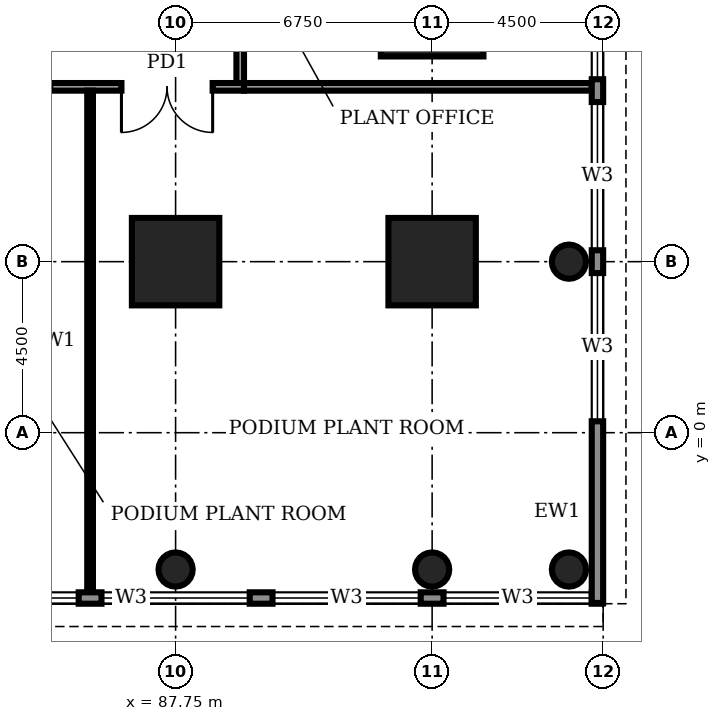
"""IFC4 building model, lengths in metres.
Left out: names, types, materials, properties, quantities, classifications, styles, units other than length and angle.
Written with IfcOpenShell. Run it as: python <this file> out.ifc"""

import sys

from ifc_helpers import new_model, si_unit, direction, frame, frame_2d, origin, origin_2d, place, context, subcontext, project, spatial, rectangle, circle, extrude, element, fill, save


model = new_model("IFC4")
c1 = context("Model", 3, precision=1e-05, world=origin(), true_north=direction((0.0, 1.0)))
c2 = subcontext(c1, "Body", "Model", "MODEL_VIEW")
j1 = project(units=[si_unit("LENGTHUNIT", "METRE"), si_unit("PLANEANGLEUNIT", "RADIAN")], contexts=[c1])
p1 = place(None, origin())
s1 = spatial("IfcSite", under=j1, at=p1, CompositionType="ELEMENT")
p2 = place(p1, origin())
s2 = spatial("IfcBuilding", under=s1, at=p2, CompositionType="ELEMENT")
p3 = place(p2, frame((0.0, 0.0, 16.0)))
s3 = spatial("IfcBuildingStorey", under=s2, at=p3, CompositionType="ELEMENT", Elevation=16.0)
for number, where, z_axis, x_axis in (
    (1, (87.75, 4.5, 0.0), (0.0, 0.0, 1.0), (1.0, 0.0, 0.0)),
    (2, (94.5, 4.5, 0.0), (0.0, 0.0, 1.0), (1.0, 0.0, 0.0)),
):
    element("IfcColumn", number, at=place(p3, frame(where, z_axis=z_axis, x_axis=x_axis)), inside=s3, PredefinedType="COLUMN", context=c2, shape_type="SweptSolid", body=[
        extrude(rectangle(XDim=2.3, YDim=2.3, at=origin_2d()), origin(), (0.0, 0.0, 1.0), 5.0),
    ])
p4 = place(p3, frame((94.5, 11.25, 0.0), z_axis=(0.0, 0.0, 1.0), x_axis=(1.0, 0.0, 0.0)))
e3 = element("IfcColumn", 3, at=p4, inside=s3, PredefinedType="COLUMN", context=c2, shape_type="SweptSolid", body=[
    extrude(rectangle(XDim=2.7, YDim=2.7, at=origin_2d()), origin(), (0.0, 0.0, 1.0), 5.0),
])
for number, where, z_axis, x_axis in (
    (4, (87.75, -3.6, 0.0), (0.0, 0.0, 1.0), (1.0, 0.0, 0.0)),
    (5, (94.5, -3.6, 0.0), (0.0, 0.0, 1.0), (1.0, 0.0, 0.0)),
    (6, (98.1, -3.6, 0.0), (0.0, 0.0, 1.0), (1.0, 0.0, 0.0)),
    (7, (98.1, 4.5, 0.0), (0.0, 0.0, 1.0), (1.0, 0.0, 0.0)),
):
    element("IfcColumn", number, at=place(p3, frame(where, z_axis=z_axis, x_axis=x_axis)), inside=s3, PredefinedType="COLUMN", context=c2, shape_type="SweptSolid", body=[
        extrude(circle(Radius=0.45, at=origin_2d()), origin(), (0.0, 0.0, 1.0), 5.0),
    ])
p5 = place(p3, frame((0.02, -4.35, 0.0), z_axis=(0.0, 0.0, 1.0), x_axis=(1.0, 0.0, 0.0)))
e8 = element("IfcWall", 8, at=p5, inside=s3, PredefinedType="STANDARD", context=c2, shape_type="SweptSolid", body=[
    extrude(rectangle(XDim=98.96, YDim=0.3, at=frame_2d((49.48, 0.0))), origin(), (0.0, 0.0, 1.0), 4.7),
])
p6 = place(p5, frame((4.78, 0.0, 0.95)))
e9 = element("IfcOpeningElement", 9, at=p6, cuts=e8, PredefinedType="OPENING", context=c2, shape_type="SweptSolid", body=[
    extrude(rectangle(XDim=3.9, YDim=1.8, at=frame_2d((1.95, 0.9))), frame((0.0, 0.16, 0.0), z_axis=(0.0, -1.0, 0.0), x_axis=(1.0, 0.0, 0.0)), (0.0, 0.0, 1.0), 0.32),
])
p7 = place(p5, frame((9.28, 0.0, 0.95)))
e10 = element("IfcOpeningElement", 10, at=p7, cuts=e8, PredefinedType="OPENING", context=c2, shape_type="SweptSolid", body=[
    extrude(rectangle(XDim=3.9, YDim=1.8, at=frame_2d((1.95, 0.9))), frame((0.0, 0.16, 0.0), z_axis=(0.0, -1.0, 0.0), x_axis=(1.0, 0.0, 0.0)), (0.0, 0.0, 1.0), 0.32),
])
p8 = place(p5, frame((13.78, 0.0, 0.95)))
e11 = element("IfcOpeningElement", 11, at=p8, cuts=e8, PredefinedType="OPENING", context=c2, shape_type="SweptSolid", body=[
    extrude(rectangle(XDim=3.9, YDim=1.8, at=frame_2d((1.95, 0.9))), frame((0.0, 0.16, 0.0), z_axis=(0.0, -1.0, 0.0), x_axis=(1.0, 0.0, 0.0)), (0.0, 0.0, 1.0), 0.32),
])
p9 = place(p5, frame((18.28, 0.0, 0.95)))
e12 = element("IfcOpeningElement", 12, at=p9, cuts=e8, PredefinedType="OPENING", context=c2, shape_type="SweptSolid", body=[
    extrude(rectangle(XDim=3.9, YDim=1.8, at=frame_2d((1.95, 0.9))), frame((0.0, 0.16, 0.0), z_axis=(0.0, -1.0, 0.0), x_axis=(1.0, 0.0, 0.0)), (0.0, 0.0, 1.0), 0.32),
])
p10 = place(p5, frame((22.78, 0.0, 0.95)))
e13 = element("IfcOpeningElement", 13, at=p10, cuts=e8, PredefinedType="OPENING", context=c2, shape_type="SweptSolid", body=[
    extrude(rectangle(XDim=3.9, YDim=1.8, at=frame_2d((1.95, 0.9))), frame((0.0, 0.16, 0.0), z_axis=(0.0, -1.0, 0.0), x_axis=(1.0, 0.0, 0.0)), (0.0, 0.0, 1.0), 0.32),
])
p11 = place(p5, frame((27.28, 0.0, 0.95)))
e14 = element("IfcOpeningElement", 14, at=p11, cuts=e8, PredefinedType="OPENING", context=c2, shape_type="SweptSolid", body=[
    extrude(rectangle(XDim=3.9, YDim=1.8, at=frame_2d((1.95, 0.9))), frame((0.0, 0.16, 0.0), z_axis=(0.0, -1.0, 0.0), x_axis=(1.0, 0.0, 0.0)), (0.0, 0.0, 1.0), 0.32),
])
p12 = place(p5, frame((31.78, 0.0, 0.95)))
e15 = element("IfcOpeningElement", 15, at=p12, cuts=e8, PredefinedType="OPENING", context=c2, shape_type="SweptSolid", body=[
    extrude(rectangle(XDim=3.9, YDim=1.8, at=frame_2d((1.95, 0.9))), frame((0.0, 0.16, 0.0), z_axis=(0.0, -1.0, 0.0), x_axis=(1.0, 0.0, 0.0)), (0.0, 0.0, 1.0), 0.32),
])
p13 = place(p5, frame((36.28, 0.0, 0.95)))
e16 = element("IfcOpeningElement", 16, at=p13, cuts=e8, PredefinedType="OPENING", context=c2, shape_type="SweptSolid", body=[
    extrude(rectangle(XDim=3.9, YDim=1.8, at=frame_2d((1.95, 0.9))), frame((0.0, 0.16, 0.0), z_axis=(0.0, -1.0, 0.0), x_axis=(1.0, 0.0, 0.0)), (0.0, 0.0, 1.0), 0.32),
])
p14 = place(p5, frame((40.78, 0.0, 0.95)))
e17 = element("IfcOpeningElement", 17, at=p14, cuts=e8, PredefinedType="OPENING", context=c2, shape_type="SweptSolid", body=[
    extrude(rectangle(XDim=3.9, YDim=1.8, at=frame_2d((1.95, 0.9))), frame((0.0, 0.16, 0.0), z_axis=(0.0, -1.0, 0.0), x_axis=(1.0, 0.0, 0.0)), (0.0, 0.0, 1.0), 0.32),
])
p15 = place(p5, frame((45.28, 0.0, 0.95)))
e18 = element("IfcOpeningElement", 18, at=p15, cuts=e8, PredefinedType="OPENING", context=c2, shape_type="SweptSolid", body=[
    extrude(rectangle(XDim=3.9, YDim=1.8, at=frame_2d((1.95, 0.9))), frame((0.0, 0.16, 0.0), z_axis=(0.0, -1.0, 0.0), x_axis=(1.0, 0.0, 0.0)), (0.0, 0.0, 1.0), 0.32),
])
p16 = place(p5, frame((49.78, 0.0, 0.95)))
e19 = element("IfcOpeningElement", 19, at=p16, cuts=e8, PredefinedType="OPENING", context=c2, shape_type="SweptSolid", body=[
    extrude(rectangle(XDim=3.9, YDim=1.8, at=frame_2d((1.95, 0.9))), frame((0.0, 0.16, 0.0), z_axis=(0.0, -1.0, 0.0), x_axis=(1.0, 0.0, 0.0)), (0.0, 0.0, 1.0), 0.32),
])
p17 = place(p5, frame((54.28, 0.0, 0.95)))
e20 = element("IfcOpeningElement", 20, at=p17, cuts=e8, PredefinedType="OPENING", context=c2, shape_type="SweptSolid", body=[
    extrude(rectangle(XDim=3.9, YDim=1.8, at=frame_2d((1.95, 0.9))), frame((0.0, 0.16, 0.0), z_axis=(0.0, -1.0, 0.0), x_axis=(1.0, 0.0, 0.0)), (0.0, 0.0, 1.0), 0.32),
])
p18 = place(p5, frame((58.78, 0.0, 0.95)))
e21 = element("IfcOpeningElement", 21, at=p18, cuts=e8, PredefinedType="OPENING", context=c2, shape_type="SweptSolid", body=[
    extrude(rectangle(XDim=3.9, YDim=1.8, at=frame_2d((1.95, 0.9))), frame((0.0, 0.16, 0.0), z_axis=(0.0, -1.0, 0.0), x_axis=(1.0, 0.0, 0.0)), (0.0, 0.0, 1.0), 0.32),
])
p19 = place(p5, frame((63.28, 0.0, 0.95)))
e22 = element("IfcOpeningElement", 22, at=p19, cuts=e8, PredefinedType="OPENING", context=c2, shape_type="SweptSolid", body=[
    extrude(rectangle(XDim=3.9, YDim=1.8, at=frame_2d((1.95, 0.9))), frame((0.0, 0.16, 0.0), z_axis=(0.0, -1.0, 0.0), x_axis=(1.0, 0.0, 0.0)), (0.0, 0.0, 1.0), 0.32),
])
p20 = place(p5, frame((67.78, 0.0, 0.95)))
e23 = element("IfcOpeningElement", 23, at=p20, cuts=e8, PredefinedType="OPENING", context=c2, shape_type="SweptSolid", body=[
    extrude(rectangle(XDim=3.9, YDim=1.8, at=frame_2d((1.95, 0.9))), frame((0.0, 0.16, 0.0), z_axis=(0.0, -1.0, 0.0), x_axis=(1.0, 0.0, 0.0)), (0.0, 0.0, 1.0), 0.32),
])
p21 = place(p5, frame((72.28, 0.0, 0.95)))
e24 = element("IfcOpeningElement", 24, at=p21, cuts=e8, PredefinedType="OPENING", context=c2, shape_type="SweptSolid", body=[
    extrude(rectangle(XDim=3.9, YDim=1.8, at=frame_2d((1.95, 0.9))), frame((0.0, 0.16, 0.0), z_axis=(0.0, -1.0, 0.0), x_axis=(1.0, 0.0, 0.0)), (0.0, 0.0, 1.0), 0.32),
])
p22 = place(p5, frame((76.78, 0.0, 0.95)))
e25 = element("IfcOpeningElement", 25, at=p22, cuts=e8, PredefinedType="OPENING", context=c2, shape_type="SweptSolid", body=[
    extrude(rectangle(XDim=3.9, YDim=1.8, at=frame_2d((1.95, 0.9))), frame((0.0, 0.16, 0.0), z_axis=(0.0, -1.0, 0.0), x_axis=(1.0, 0.0, 0.0)), (0.0, 0.0, 1.0), 0.32),
])
p23 = place(p5, frame((81.28, 0.0, 0.95)))
e26 = element("IfcOpeningElement", 26, at=p23, cuts=e8, PredefinedType="OPENING", context=c2, shape_type="SweptSolid", body=[
    extrude(rectangle(XDim=3.9, YDim=1.8, at=frame_2d((1.95, 0.9))), frame((0.0, 0.16, 0.0), z_axis=(0.0, -1.0, 0.0), x_axis=(1.0, 0.0, 0.0)), (0.0, 0.0, 1.0), 0.32),
])
p24 = place(p5, frame((85.78, 0.0, 0.95)))
e27 = element("IfcOpeningElement", 27, at=p24, cuts=e8, PredefinedType="OPENING", context=c2, shape_type="SweptSolid", body=[
    extrude(rectangle(XDim=3.9, YDim=1.8, at=frame_2d((1.95, 0.9))), frame((0.0, 0.16, 0.0), z_axis=(0.0, -1.0, 0.0), x_axis=(1.0, 0.0, 0.0)), (0.0, 0.0, 1.0), 0.32),
])
p25 = place(p5, frame((90.28, 0.0, 0.95)))
e28 = element("IfcOpeningElement", 28, at=p25, cuts=e8, PredefinedType="OPENING", context=c2, shape_type="SweptSolid", body=[
    extrude(rectangle(XDim=3.9, YDim=1.8, at=frame_2d((1.95, 0.9))), frame((0.0, 0.16, 0.0), z_axis=(0.0, -1.0, 0.0), x_axis=(1.0, 0.0, 0.0)), (0.0, 0.0, 1.0), 0.32),
])
p26 = place(p5, frame((94.78, 0.0, 0.95)))
e29 = element("IfcOpeningElement", 29, at=p26, cuts=e8, PredefinedType="OPENING", context=c2, shape_type="SweptSolid", body=[
    extrude(rectangle(XDim=3.9, YDim=1.8, at=frame_2d((1.95, 0.9))), frame((0.0, 0.16, 0.0), z_axis=(0.0, -1.0, 0.0), x_axis=(1.0, 0.0, 0.0)), (0.0, 0.0, 1.0), 0.32),
])
p27 = place(p3, frame((98.85, -4.48, 0.0), z_axis=(0.0, 0.0, 1.0), x_axis=(0.0, 1.0, 0.0)))
e30 = element("IfcWall", 30, at=p27, inside=s3, PredefinedType="STANDARD", context=c2, shape_type="SweptSolid", body=[
    extrude(rectangle(XDim=53.96, YDim=0.3, at=frame_2d((26.98, 0.0))), origin(), (0.0, 0.0, 1.0), 4.7),
])
p28 = place(p27, frame((4.78, 0.0, 0.95)))
e31 = element("IfcOpeningElement", 31, at=p28, cuts=e30, PredefinedType="OPENING", context=c2, shape_type="SweptSolid", body=[
    extrude(rectangle(XDim=3.9, YDim=1.8, at=frame_2d((1.95, 0.9))), frame((0.0, 0.16, 0.0), z_axis=(0.0, -1.0, 0.0), x_axis=(1.0, 0.0, 0.0)), (0.0, 0.0, 1.0), 0.32),
])
p29 = place(p27, frame((9.28, 0.0, 0.95)))
e32 = element("IfcOpeningElement", 32, at=p29, cuts=e30, PredefinedType="OPENING", context=c2, shape_type="SweptSolid", body=[
    extrude(rectangle(XDim=3.9, YDim=1.8, at=frame_2d((1.95, 0.9))), frame((0.0, 0.16, 0.0), z_axis=(0.0, -1.0, 0.0), x_axis=(1.0, 0.0, 0.0)), (0.0, 0.0, 1.0), 0.32),
])
p30 = place(p27, frame((13.78, 0.0, 0.95)))
e33 = element("IfcOpeningElement", 33, at=p30, cuts=e30, PredefinedType="OPENING", context=c2, shape_type="SweptSolid", body=[
    extrude(rectangle(XDim=3.9, YDim=1.8, at=frame_2d((1.95, 0.9))), frame((0.0, 0.16, 0.0), z_axis=(0.0, -1.0, 0.0), x_axis=(1.0, 0.0, 0.0)), (0.0, 0.0, 1.0), 0.32),
])
p31 = place(p27, frame((18.28, 0.0, 0.95)))
e34 = element("IfcOpeningElement", 34, at=p31, cuts=e30, PredefinedType="OPENING", context=c2, shape_type="SweptSolid", body=[
    extrude(rectangle(XDim=3.9, YDim=1.8, at=frame_2d((1.95, 0.9))), frame((0.0, 0.16, 0.0), z_axis=(0.0, -1.0, 0.0), x_axis=(1.0, 0.0, 0.0)), (0.0, 0.0, 1.0), 0.32),
])
p32 = place(p27, frame((22.78, 0.0, 0.95)))
e35 = element("IfcOpeningElement", 35, at=p32, cuts=e30, PredefinedType="OPENING", context=c2, shape_type="SweptSolid", body=[
    extrude(rectangle(XDim=3.9, YDim=1.8, at=frame_2d((1.95, 0.9))), frame((0.0, 0.16, 0.0), z_axis=(0.0, -1.0, 0.0), x_axis=(1.0, 0.0, 0.0)), (0.0, 0.0, 1.0), 0.32),
])
p33 = place(p27, frame((27.28, 0.0, 0.95)))
e36 = element("IfcOpeningElement", 36, at=p33, cuts=e30, PredefinedType="OPENING", context=c2, shape_type="SweptSolid", body=[
    extrude(rectangle(XDim=3.9, YDim=1.8, at=frame_2d((1.95, 0.9))), frame((0.0, 0.16, 0.0), z_axis=(0.0, -1.0, 0.0), x_axis=(1.0, 0.0, 0.0)), (0.0, 0.0, 1.0), 0.32),
])
p34 = place(p27, frame((31.78, 0.0, 0.95)))
e37 = element("IfcOpeningElement", 37, at=p34, cuts=e30, PredefinedType="OPENING", context=c2, shape_type="SweptSolid", body=[
    extrude(rectangle(XDim=3.9, YDim=1.8, at=frame_2d((1.95, 0.9))), frame((0.0, 0.16, 0.0), z_axis=(0.0, -1.0, 0.0), x_axis=(1.0, 0.0, 0.0)), (0.0, 0.0, 1.0), 0.32),
])
p35 = place(p27, frame((36.28, 0.0, 0.95)))
e38 = element("IfcOpeningElement", 38, at=p35, cuts=e30, PredefinedType="OPENING", context=c2, shape_type="SweptSolid", body=[
    extrude(rectangle(XDim=3.9, YDim=1.8, at=frame_2d((1.95, 0.9))), frame((0.0, 0.16, 0.0), z_axis=(0.0, -1.0, 0.0), x_axis=(1.0, 0.0, 0.0)), (0.0, 0.0, 1.0), 0.32),
])
p36 = place(p27, frame((40.78, 0.0, 0.95)))
e39 = element("IfcOpeningElement", 39, at=p36, cuts=e30, PredefinedType="OPENING", context=c2, shape_type="SweptSolid", body=[
    extrude(rectangle(XDim=3.9, YDim=1.8, at=frame_2d((1.95, 0.9))), frame((0.0, 0.16, 0.0), z_axis=(0.0, -1.0, 0.0), x_axis=(1.0, 0.0, 0.0)), (0.0, 0.0, 1.0), 0.32),
])
p37 = place(p27, frame((45.28, 0.0, 0.95)))
e40 = element("IfcOpeningElement", 40, at=p37, cuts=e30, PredefinedType="OPENING", context=c2, shape_type="SweptSolid", body=[
    extrude(rectangle(XDim=3.9, YDim=1.8, at=frame_2d((1.95, 0.9))), frame((0.0, 0.16, 0.0), z_axis=(0.0, -1.0, 0.0), x_axis=(1.0, 0.0, 0.0)), (0.0, 0.0, 1.0), 0.32),
])
p38 = place(p27, frame((49.78, 0.0, 0.95)))
e41 = element("IfcOpeningElement", 41, at=p38, cuts=e30, PredefinedType="OPENING", context=c2, shape_type="SweptSolid", body=[
    extrude(rectangle(XDim=3.9, YDim=1.8, at=frame_2d((1.95, 0.9))), frame((0.0, 0.16, 0.0), z_axis=(0.0, -1.0, 0.0), x_axis=(1.0, 0.0, 0.0)), (0.0, 0.0, 1.0), 0.32),
])
p39 = place(p3, frame((72.65, 9.1, 0.0), z_axis=(0.0, 0.0, 1.0), x_axis=(1.0, 0.0, 0.0)))
e42 = element("IfcWall", 42, at=p39, inside=s3, PredefinedType="SOLIDWALL", context=c2, shape_type="SweptSolid", body=[
    extrude(rectangle(XDim=16.9, YDim=0.2, at=frame_2d((8.45, 0.0))), origin(), (0.0, 0.0, 1.0), 4.7),
])
p40 = place(p39, frame((0.925, 0.0, 0.0)))
e43 = element("IfcOpeningElement", 43, at=p40, cuts=e42, PredefinedType="OPENING", context=c2, shape_type="SweptSolid", body=[
    extrude(rectangle(XDim=1.8, YDim=2.1, at=frame_2d((0.9, 1.05))), frame((0.0, 0.11, 0.0), z_axis=(0.0, -1.0, 0.0), x_axis=(1.0, 0.0, 0.0)), (0.0, 0.0, 1.0), 0.22),
])
p41 = place(p39, frame((4.9, 0.0, 0.0)))
e44 = element("IfcOpeningElement", 44, at=p41, cuts=e42, PredefinedType="OPENING", context=c2, shape_type="SweptSolid", body=[
    extrude(rectangle(XDim=2.4, YDim=2.7, at=frame_2d((1.2, 1.35))), frame((0.0, 0.11, 0.0), z_axis=(0.0, -1.0, 0.0), x_axis=(1.0, 0.0, 0.0)), (0.0, 0.0, 1.0), 0.22),
])
p42 = place(p39, frame((9.4, 0.0, 0.0)))
e45 = element("IfcOpeningElement", 45, at=p42, cuts=e42, PredefinedType="OPENING", context=c2, shape_type="SweptSolid", body=[
    extrude(rectangle(XDim=2.4, YDim=2.7, at=frame_2d((1.2, 1.35))), frame((0.0, 0.11, 0.0), z_axis=(0.0, -1.0, 0.0), x_axis=(1.0, 0.0, 0.0)), (0.0, 0.0, 1.0), 0.22),
])
p43 = place(p39, frame((13.675, 0.0, 0.0)))
e46 = element("IfcOpeningElement", 46, at=p43, cuts=e42, PredefinedType="OPENING", context=c2, shape_type="SweptSolid", body=[
    extrude(rectangle(XDim=2.4, YDim=2.7, at=frame_2d((1.2, 1.35))), frame((0.0, 0.11, 0.0), z_axis=(0.0, -1.0, 0.0), x_axis=(1.0, 0.0, 0.0)), (0.0, 0.0, 1.0), 0.22),
])
p44 = place(p3, frame((89.45, 9.2, 0.0), z_axis=(0.0, 0.0, 1.0), x_axis=(0.0, 1.0, 0.0)))
e47 = element("IfcWall", 47, at=p44, inside=s3, PredefinedType="SOLIDWALL", context=c2, shape_type="SweptSolid", body=[
    extrude(rectangle(XDim=22.3, YDim=0.2, at=frame_2d((11.15, 0.0))), origin(), (0.0, 0.0, 1.0), 4.7),
])
p45 = place(p44, frame((1.55, 0.0, 0.0)))
e48 = element("IfcOpeningElement", 48, at=p45, cuts=e47, PredefinedType="OPENING", context=c2, shape_type="SweptSolid", body=[
    extrude(rectangle(XDim=1.0, YDim=2.1, at=frame_2d((0.5, 1.05))), frame((0.0, 0.11, 0.0), z_axis=(0.0, -1.0, 0.0), x_axis=(1.0, 0.0, 0.0)), (0.0, 0.0, 1.0), 0.22),
])
p46 = place(p44, frame((5.75, 0.0, 0.0)))
e49 = element("IfcOpeningElement", 49, at=p46, cuts=e47, PredefinedType="OPENING", context=c2, shape_type="SweptSolid", body=[
    extrude(rectangle(XDim=0.9, YDim=2.1, at=frame_2d((0.45, 1.05))), frame((0.0, 0.11, 0.0), z_axis=(0.0, -1.0, 0.0), x_axis=(1.0, 0.0, 0.0)), (0.0, 0.0, 1.0), 0.22),
])
p47 = place(p44, frame((8.75, 0.0, 0.0)))
e50 = element("IfcOpeningElement", 50, at=p47, cuts=e47, PredefinedType="OPENING", context=c2, shape_type="SweptSolid", body=[
    extrude(rectangle(XDim=0.9, YDim=2.1, at=frame_2d((0.45, 1.05))), frame((0.0, 0.11, 0.0), z_axis=(0.0, -1.0, 0.0), x_axis=(1.0, 0.0, 0.0)), (0.0, 0.0, 1.0), 0.22),
])
p48 = place(p44, frame((13.6, 0.0, 0.0)))
e51 = element("IfcOpeningElement", 51, at=p48, cuts=e47, PredefinedType="OPENING", context=c2, shape_type="SweptSolid", body=[
    extrude(rectangle(XDim=0.9, YDim=2.1, at=frame_2d((0.45, 1.05))), frame((0.0, 0.11, 0.0), z_axis=(0.0, -1.0, 0.0), x_axis=(1.0, 0.0, 0.0)), (0.0, 0.0, 1.0), 0.22),
])
p49 = place(p44, frame((16.3, 0.0, 0.0)))
e52 = element("IfcOpeningElement", 52, at=p49, cuts=e47, PredefinedType="OPENING", context=c2, shape_type="SweptSolid", body=[
    extrude(rectangle(XDim=1.0, YDim=2.1, at=frame_2d((0.5, 1.05))), frame((0.0, 0.11, 0.0), z_axis=(0.0, -1.0, 0.0), x_axis=(1.0, 0.0, 0.0)), (0.0, 0.0, 1.0), 0.22),
])
p50 = place(p44, frame((10.8, 0.0, 0.0)))
e53 = element("IfcOpeningElement", 53, at=p50, cuts=e47, PredefinedType="OPENING", context=c2, shape_type="SweptSolid", body=[
    extrude(rectangle(XDim=1.0, YDim=2.1, at=frame_2d((0.5, 1.05))), frame((0.0, 0.11, 0.0), z_axis=(0.0, -1.0, 0.0), x_axis=(1.0, 0.0, 0.0)), (0.0, 0.0, 1.0), 0.22),
])
p51 = place(p44, frame((19.55, 0.0, 0.0)))
e54 = element("IfcOpeningElement", 54, at=p51, cuts=e47, PredefinedType="OPENING", context=c2, shape_type="SweptSolid", body=[
    extrude(rectangle(XDim=1.0, YDim=2.1, at=frame_2d((0.5, 1.05))), frame((0.0, 0.11, 0.0), z_axis=(0.0, -1.0, 0.0), x_axis=(1.0, 0.0, 0.0)), (0.0, 0.0, 1.0), 0.22),
])
p52 = place(p3, frame((89.55, 9.1, 0.0), z_axis=(0.0, 0.0, 1.0), x_axis=(1.0, 0.0, 0.0)))
e55 = element("IfcWall", 55, at=p52, inside=s3, PredefinedType="SOLIDWALL", context=c2, shape_type="SweptSolid", body=[
    extrude(rectangle(XDim=9.15, YDim=0.2, at=frame_2d((4.575, 0.0))), origin(), (0.0, 0.0, 1.0), 4.7),
])
p53 = place(p3, frame((85.5, -4.2, 0.0), z_axis=(0.0, 0.0, 1.0), x_axis=(0.0, 1.0, 0.0)))
e56 = element("IfcWall", 56, at=p53, inside=s3, PredefinedType="PARTITIONING", context=c2, shape_type="SweptSolid", body=[
    extrude(rectangle(XDim=13.2, YDim=0.15, at=frame_2d((6.6, 0.0))), origin(), (0.0, 0.0, 1.0), 4.7),
])
p54 = place(p23, origin())
e57 = element("IfcWindow", 57, at=p54, inside=s3, PartitioningType="SINGLE_PANEL", PredefinedType="WINDOW", context=c2, shape_type="SweptSolid", body=[
    extrude(rectangle(XDim=3.9, YDim=1.8, at=frame_2d((1.95, 0.9))), frame((0.0, 0.03, 0.0), z_axis=(0.0, -1.0, 0.0), x_axis=(1.0, 0.0, 0.0)), (0.0, 0.0, 1.0), 0.06),
])
fill(e26, e57)
p55 = place(p24, origin())
e58 = element("IfcWindow", 58, at=p55, inside=s3, PartitioningType="SINGLE_PANEL", PredefinedType="WINDOW", context=c2, shape_type="SweptSolid", body=[
    extrude(rectangle(XDim=3.9, YDim=1.8, at=frame_2d((1.95, 0.9))), frame((0.0, 0.03, 0.0), z_axis=(0.0, -1.0, 0.0), x_axis=(1.0, 0.0, 0.0)), (0.0, 0.0, 1.0), 0.06),
])
fill(e27, e58)
p56 = place(p25, origin())
e59 = element("IfcWindow", 59, at=p56, inside=s3, PartitioningType="SINGLE_PANEL", PredefinedType="WINDOW", context=c2, shape_type="SweptSolid", body=[
    extrude(rectangle(XDim=3.9, YDim=1.8, at=frame_2d((1.95, 0.9))), frame((0.0, 0.03, 0.0), z_axis=(0.0, -1.0, 0.0), x_axis=(1.0, 0.0, 0.0)), (0.0, 0.0, 1.0), 0.06),
])
fill(e28, e59)
p57 = place(p26, origin())
e60 = element("IfcWindow", 60, at=p57, inside=s3, PartitioningType="SINGLE_PANEL", PredefinedType="WINDOW", context=c2, shape_type="SweptSolid", body=[
    extrude(rectangle(XDim=3.9, YDim=1.8, at=frame_2d((1.95, 0.9))), frame((0.0, 0.03, 0.0), z_axis=(0.0, -1.0, 0.0), x_axis=(1.0, 0.0, 0.0)), (0.0, 0.0, 1.0), 0.06),
])
fill(e29, e60)
p58 = place(p28, origin())
e61 = element("IfcWindow", 61, at=p58, inside=s3, PartitioningType="SINGLE_PANEL", PredefinedType="WINDOW", context=c2, shape_type="SweptSolid", body=[
    extrude(rectangle(XDim=3.9, YDim=1.8, at=frame_2d((1.95, 0.9))), frame((0.0, 0.03, 0.0), z_axis=(0.0, -1.0, 0.0), x_axis=(1.0, 0.0, 0.0)), (0.0, 0.0, 1.0), 0.06),
])
fill(e31, e61)
p59 = place(p29, origin())
e62 = element("IfcWindow", 62, at=p59, inside=s3, PartitioningType="SINGLE_PANEL", PredefinedType="WINDOW", context=c2, shape_type="SweptSolid", body=[
    extrude(rectangle(XDim=3.9, YDim=1.8, at=frame_2d((1.95, 0.9))), frame((0.0, 0.03, 0.0), z_axis=(0.0, -1.0, 0.0), x_axis=(1.0, 0.0, 0.0)), (0.0, 0.0, 1.0), 0.06),
])
fill(e32, e62)
p60 = place(p30, origin())
e63 = element("IfcWindow", 63, at=p60, inside=s3, PartitioningType="SINGLE_PANEL", PredefinedType="WINDOW", context=c2, shape_type="SweptSolid", body=[
    extrude(rectangle(XDim=3.9, YDim=1.8, at=frame_2d((1.95, 0.9))), frame((0.0, 0.03, 0.0), z_axis=(0.0, -1.0, 0.0), x_axis=(1.0, 0.0, 0.0)), (0.0, 0.0, 1.0), 0.06),
])
fill(e33, e63)
p61 = place(p43, frame((2.4, 0.0, 0.0), z_axis=(0.0, 0.0, 1.0), x_axis=(-1.0, 0.0, 0.0)))
e64 = element("IfcDoor", 64, at=p61, inside=s3, OperationType="DOUBLE_DOOR_SINGLE_SWING", PredefinedType="DOOR", context=c2, shape_type="SweptSolid", body=[
    extrude(rectangle(XDim=2.4, YDim=2.7, at=frame_2d((1.2, 1.35))), frame((0.0, 0.025, 0.0), z_axis=(0.0, -1.0, 0.0), x_axis=(1.0, 0.0, 0.0)), (0.0, 0.0, 1.0), 0.05),
])
fill(e46, e64)
save(model, sys.argv[1])
